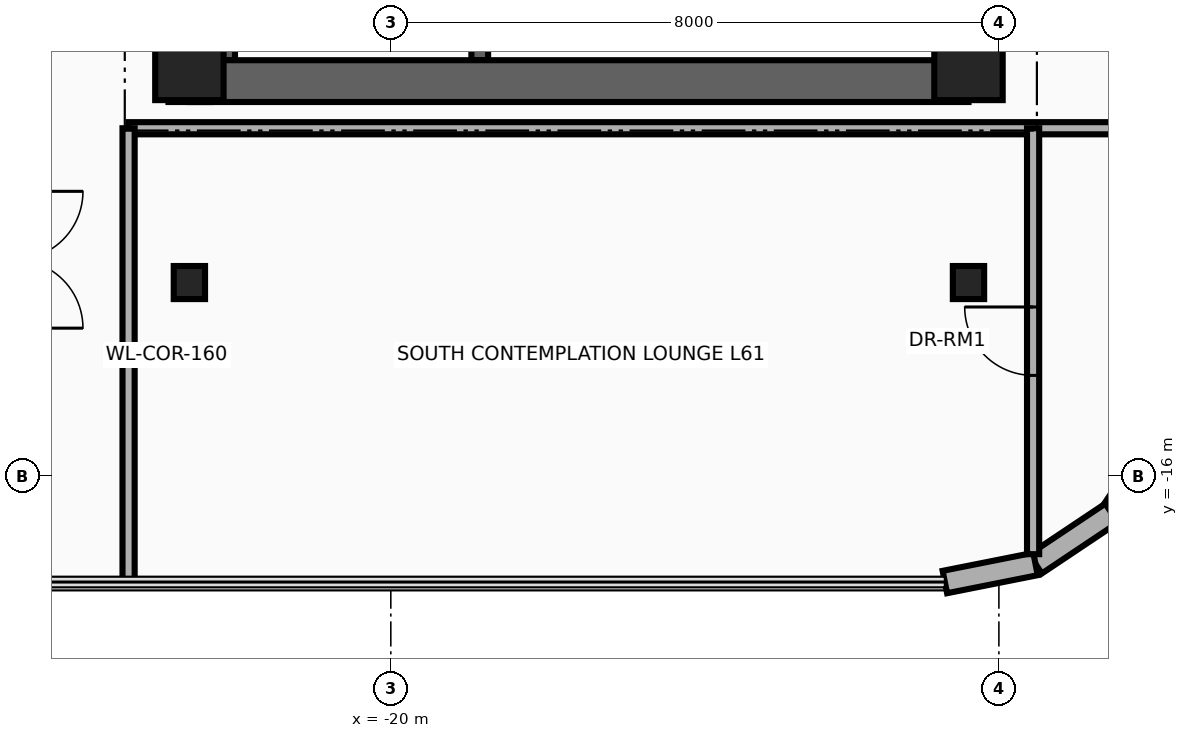
"""IFC4 building model, lengths in metres.
Left out: names, types, materials, properties, quantities, classifications, styles, units other than length and angle.
Written with IfcOpenShell. Run it as: python <this file> out.ifc"""

import sys

from ifc_helpers import new_model, si_unit, direction, frame, frame_2d, origin, origin_2d, place, context, subcontext, project, spatial, rectangle, i_section, extrude, source, transform, mapped, element, fill, save


model = new_model("IFC4")
c1 = context("Model", 3, precision=1e-05, world=origin(), true_north=direction((0.0, 1.0)))
c2 = subcontext(c1, "Body", "Model", "MODEL_VIEW")
j1 = project(units=[si_unit("LENGTHUNIT", "METRE"), si_unit("PLANEANGLEUNIT", "RADIAN")], contexts=[c1])
p1 = place(None, origin())
s1 = spatial("IfcSite", under=j1, at=p1, CompositionType="ELEMENT")
p2 = place(p1, origin())
s2 = spatial("IfcBuilding", under=s1, at=p2, CompositionType="ELEMENT")
p3 = place(p2, frame((0.0, 0.0, 237.0)))
s3 = spatial("IfcBuildingStorey", under=s2, at=p3, CompositionType="ELEMENT", Elevation=237.0)
for number, where, z_axis, x_axis in (
    (1, (-22.16, -10.525, 0.0), (0.0, 0.0, 1.0), (0.0, 1.0, 0.0)),
    (2, (-18.83, -10.525, 0.0), (0.0, 0.0, 1.0), (0.0, 1.0, 0.0)),
):
    element("IfcWall", number, at=place(p3, frame(where, z_axis=z_axis, x_axis=x_axis)), inside=s3, PredefinedType="SHEAR", context=c2, shape_type="SweptSolid", body=[
        extrude(rectangle(XDim=8.745, YDim=0.22, at=frame_2d((4.373, 0.0))), origin(), (0.0, 0.0, 1.0), 3.26),
    ])
p4 = place(p3, frame((-22.65, -11.075, 0.0), z_axis=(0.0, 0.0, 1.0), x_axis=(0.0, 1.0, 0.0)))
e3 = element("IfcWall", 3, at=p4, inside=s3, PredefinedType="SHEAR", context=c2, shape_type="SweptSolid", body=[
    extrude(rectangle(XDim=22.15, YDim=0.55, at=frame_2d((11.075, 0.0))), origin(), (0.0, 0.0, 1.0), 3.26),
])
p5 = place(p3, frame((-22.65, -10.8, 0.0), z_axis=(0.0, 0.0, 1.0), x_axis=(1.0, 0.0, 0.0)))
e4 = element("IfcWall", 4, at=p5, inside=s3, PredefinedType="SHEAR", context=c2, shape_type="SweptSolid", body=[
    extrude(rectangle(XDim=10.25, YDim=0.55, at=frame_2d((5.125, 0.0))), origin(), (0.0, 0.0, 1.0), 3.26),
])
m1 = source(origin(), c2, "Body", "SweptSolid", [
    extrude(rectangle(XDim=0.9, YDim=0.9, at=origin_2d()), origin(), (0.0, 0.0, 1.0), 3.5),
])
for number, where, z_axis, x_axis in (
    (5, (-22.65, -10.6, 0.0), (0.0, 0.0, 1.0), (1.0, 0.0, 0.0)),
    (6, (-12.4, -10.6, 0.0), (0.0, 0.0, 1.0), (1.0, 0.0, 0.0)),
):
    element("IfcColumn", number, at=place(p3, frame(where, z_axis=z_axis, x_axis=x_axis)), inside=s3, PredefinedType="COLUMN", context=c2, shape_type="MappedRepresentation", body=[
        mapped(m1, transform((0.0, 0.0, 0.0), x_axis=(1.0, 0.0, 0.0), y_axis=(0.0, 1.0, 0.0), z_axis=(0.0, 0.0, 1.0), scale=1.0)),
    ])
m2 = source(origin(), c2, "Body", "SweptSolid", [
    extrude(i_section(OverallWidth=0.412, OverallDepth=0.435, WebThickness=0.036, FlangeThickness=0.057, at=origin_2d()), origin(), (0.0, 0.0, 1.0), 3.5),
])
for number, where, z_axis, x_axis in (
    (7, (-22.65, -13.45, 0.0), (0.0, 0.0, 1.0), (1.0, 0.0, 0.0)),
    (8, (-12.4, -13.45, 0.0), (0.0, 0.0, 1.0), (1.0, 0.0, 0.0)),
):
    element("IfcColumn", number, at=place(p3, frame(where, z_axis=z_axis, x_axis=x_axis)), inside=s3, PredefinedType="COLUMN", context=c2, shape_type="MappedRepresentation", body=[
        mapped(m2, transform((0.0, 0.0, 0.0), x_axis=(1.0, 0.0, 0.0), y_axis=(0.0, 1.0, 0.0), z_axis=(0.0, 0.0, 1.0), scale=1.0)),
    ])
for number, where, z_axis, x_axis in (
    (9, (-9.847, -15.482, 0.0), (0.0, 0.0, 1.0), (-0.556, -0.831, 0.0)),
    (10, (-10.517, -16.483, 0.0), (0.0, 0.0, 1.0), (-0.831, -0.556, 0.0)),
):
    element("IfcWall", number, at=place(p3, frame(where, z_axis=z_axis, x_axis=x_axis)), inside=s3, PredefinedType="SOLIDWALL", context=c2, shape_type="SweptSolid", body=[
        extrude(rectangle(XDim=1.205, YDim=0.3, at=frame_2d((0.603, 0.0))), origin(), (0.0, 0.0, 1.0), 3.26),
    ])
p6 = place(p3, frame((-11.518, -17.153, 0.0), z_axis=(0.0, 0.0, 1.0), x_axis=(-0.980804027463, -0.194996050505, 0.0)))
e11 = element("IfcWall", 11, at=p6, inside=s3, PredefinedType="SOLIDWALL", context=c2, shape_type="SweptSolid", body=[
    extrude(rectangle(XDim=1.216, YDim=0.3, at=frame_2d((0.608, 0.0))), origin(), (0.0, 0.0, 1.0), 3.26),
])
p7 = place(p3, frame((-23.45, -11.42, 0.0), z_axis=(0.0, 0.0, 1.0), x_axis=(1.0, 0.0, 0.0)))
e12 = element("IfcWall", 12, at=p7, inside=s3, PredefinedType="PARTITIONING", context=c2, shape_type="SweptSolid", body=[
    extrude(rectangle(XDim=13.84, YDim=0.16, at=frame_2d((6.92, 0.0))), origin(), (0.0, 0.0, 1.0), 2.634),
])
p8 = place(p3, frame((-23.45, -17.39, 0.0), z_axis=(0.0, 0.0, 1.0), x_axis=(0.0, 1.0, 0.0)))
e13 = element("IfcWall", 13, at=p8, inside=s3, PredefinedType="PARTITIONING", context=c2, shape_type="SweptSolid", body=[
    extrude(rectangle(XDim=5.97, YDim=0.16, at=frame_2d((2.985, 0.0))), origin(), (0.0, 0.0, 1.0), 3.26),
])
p9 = place(p3, frame((-11.55, -17.024, 0.0), z_axis=(0.0, 0.0, 1.0), x_axis=(0.0, 1.0, 0.0)))
e14 = element("IfcWall", 14, at=p9, inside=s3, PredefinedType="PARTITIONING", context=c2, shape_type="SweptSolid", body=[
    extrude(rectangle(XDim=5.604, YDim=0.16, at=frame_2d((2.802, 0.0))), origin(), (0.0, 0.0, 1.0), 3.26),
])
p10 = place(p9, frame((2.352, 0.0, 0.0)))
e15 = element("IfcOpeningElement", 15, at=p10, cuts=e14, PredefinedType="OPENING", context=c2, shape_type="SweptSolid", body=[
    extrude(rectangle(XDim=0.9, YDim=2.1, at=frame_2d((0.45, 1.05))), frame((0.0, 0.095, 0.0), z_axis=(0.0, -1.0, 0.0), x_axis=(1.0, 0.0, 0.0)), (0.0, 0.0, 1.0), 0.19),
])
p11 = place(p10, origin())
e16 = element("IfcDoor", 16, at=p11, inside=s3, OperationType="SINGLE_SWING_RIGHT", PredefinedType="DOOR", context=c2, shape_type="SweptSolid", body=[
    extrude(rectangle(XDim=0.9, YDim=2.1, at=frame_2d((0.45, 1.05))), frame((0.0, 0.025, 0.0), z_axis=(0.0, -1.0, 0.0), x_axis=(1.0, 0.0, 0.0)), (0.0, 0.0, 1.0), 0.05),
])
fill(e15, e16)
save(model, sys.argv[1])
